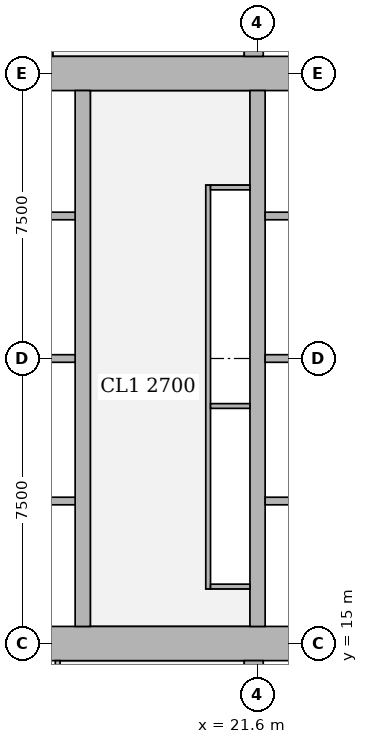
"""IFC4 building model, lengths in metres.
Left out: names, types, materials, properties, quantities, classifications, styles, units other than length and angle.
Written with IfcOpenShell. Run it as: python <this file> out.ifc"""

import sys

from ifc_helpers import new_model, si_unit, direction, frame, frame_2d, origin, place, context, subcontext, project, spatial, rectangle, extrude, element, fill, save


model = new_model("IFC4")
c1 = context("Model", 3, precision=1e-05, world=origin(), true_north=direction((0.0, 1.0)))
c2 = subcontext(c1, "Body", "Model", "MODEL_VIEW")
j1 = project(units=[si_unit("LENGTHUNIT", "METRE"), si_unit("PLANEANGLEUNIT", "RADIAN")], contexts=[c1])
p1 = place(None, origin())
s1 = spatial("IfcSite", under=j1, at=p1, CompositionType="ELEMENT")
p2 = place(p1, origin())
s2 = spatial("IfcBuilding", under=s1, at=p2, CompositionType="ELEMENT")
p3 = place(p2, frame((0.0, 0.0, 42.5)))
s3 = spatial("IfcBuildingStorey", under=s2, at=p3, CompositionType="ELEMENT", Elevation=42.5)
p4 = place(p3, frame((13.95, 15.0, 0.0), z_axis=(0.0, 0.0, 1.0), x_axis=(1.0, 0.0, 0.0)))
e1 = element("IfcWall", 1, at=p4, inside=s3, PredefinedType="SHEAR", context=c2, shape_type="SweptSolid", body=[
    extrude(rectangle(XDim=15.3, YDim=0.9, at=frame_2d((7.65, 0.0))), origin(), (0.0, 0.0, 1.0), 3.75),
])
p5 = place(p4, frame((4.45, 0.0, 0.0)))
e2 = element("IfcOpeningElement", 2, at=p5, cuts=e1, PredefinedType="OPENING", context=c2, shape_type="SweptSolid", body=[
    extrude(rectangle(XDim=1.8, YDim=2.1, at=frame_2d((0.9, 1.05))), frame((0.0, 0.46, 0.0), z_axis=(0.0, -1.0, 0.0), x_axis=(1.0, 0.0, 0.0)), (0.0, 0.0, 1.0), 0.92),
])
p6 = place(p4, frame((10.7, 0.0, 0.0)))
e3 = element("IfcOpeningElement", 3, at=p6, cuts=e1, PredefinedType="OPENING", context=c2, shape_type="SweptSolid", body=[
    extrude(rectangle(XDim=1.1, YDim=2.1, at=frame_2d((0.55, 1.05))), frame((0.0, 0.46, 0.0), z_axis=(0.0, -1.0, 0.0), x_axis=(1.0, 0.0, 0.0)), (0.0, 0.0, 1.0), 0.92),
])
p7 = place(p3, frame((13.95, 30.0, 0.0), z_axis=(0.0, 0.0, 1.0), x_axis=(1.0, 0.0, 0.0)))
e4 = element("IfcWall", 4, at=p7, inside=s3, PredefinedType="SHEAR", context=c2, shape_type="SweptSolid", body=[
    extrude(rectangle(XDim=15.3, YDim=0.9, at=frame_2d((7.65, 0.0))), origin(), (0.0, 0.0, 1.0), 3.75),
])
p8 = place(p7, frame((4.45, 0.0, 0.0)))
e5 = element("IfcOpeningElement", 5, at=p8, cuts=e4, PredefinedType="OPENING", context=c2, shape_type="SweptSolid", body=[
    extrude(rectangle(XDim=1.8, YDim=2.1, at=frame_2d((0.9, 1.05))), frame((0.0, 0.46, 0.0), z_axis=(0.0, -1.0, 0.0), x_axis=(1.0, 0.0, 0.0)), (0.0, 0.0, 1.0), 0.92),
])
p9 = place(p7, frame((10.7, 0.0, 0.0)))
e6 = element("IfcOpeningElement", 6, at=p9, cuts=e4, PredefinedType="OPENING", context=c2, shape_type="SweptSolid", body=[
    extrude(rectangle(XDim=1.1, YDim=2.1, at=frame_2d((0.55, 1.05))), frame((0.0, 0.46, 0.0), z_axis=(0.0, -1.0, 0.0), x_axis=(1.0, 0.0, 0.0)), (0.0, 0.0, 1.0), 0.92),
])
p10 = place(p3, frame((17.0, 15.45, 0.0), z_axis=(0.0, 0.0, 1.0), x_axis=(0.0, 1.0, 0.0)))
e7 = element("IfcWall", 7, at=p10, inside=s3, PredefinedType="SHEAR", context=c2, shape_type="SweptSolid", body=[
    extrude(rectangle(XDim=14.1, YDim=0.4, at=frame_2d((7.05, 0.0))), origin(), (0.0, 0.0, 1.0), 3.75),
])
p11 = place(p10, frame((0.875, 0.0, 0.0)))
e8 = element("IfcOpeningElement", 8, at=p11, cuts=e7, PredefinedType="OPENING", context=c2, shape_type="SweptSolid", body=[
    extrude(rectangle(XDim=1.1, YDim=2.1, at=frame_2d((0.55, 1.05))), frame((0.0, 0.21, 0.0), z_axis=(0.0, -1.0, 0.0), x_axis=(1.0, 0.0, 0.0)), (0.0, 0.0, 1.0), 0.42),
])
p12 = place(p10, frame((4.625, 0.0, 0.0)))
e9 = element("IfcOpeningElement", 9, at=p12, cuts=e7, PredefinedType="OPENING", context=c2, shape_type="SweptSolid", body=[
    extrude(rectangle(XDim=1.1, YDim=2.1, at=frame_2d((0.55, 1.05))), frame((0.0, 0.21, 0.0), z_axis=(0.0, -1.0, 0.0), x_axis=(1.0, 0.0, 0.0)), (0.0, 0.0, 1.0), 0.42),
])
p13 = place(p10, frame((8.375, 0.0, 0.0)))
e10 = element("IfcOpeningElement", 10, at=p13, cuts=e7, PredefinedType="OPENING", context=c2, shape_type="SweptSolid", body=[
    extrude(rectangle(XDim=1.1, YDim=2.1, at=frame_2d((0.55, 1.05))), frame((0.0, 0.21, 0.0), z_axis=(0.0, -1.0, 0.0), x_axis=(1.0, 0.0, 0.0)), (0.0, 0.0, 1.0), 0.42),
])
p14 = place(p10, frame((12.125, 0.0, 0.0)))
e11 = element("IfcOpeningElement", 11, at=p14, cuts=e7, PredefinedType="OPENING", context=c2, shape_type="SweptSolid", body=[
    extrude(rectangle(XDim=1.1, YDim=2.1, at=frame_2d((0.55, 1.05))), frame((0.0, 0.21, 0.0), z_axis=(0.0, -1.0, 0.0), x_axis=(1.0, 0.0, 0.0)), (0.0, 0.0, 1.0), 0.42),
])
p15 = place(p3, frame((21.6, 15.45, 0.0), z_axis=(0.0, 0.0, 1.0), x_axis=(0.0, 1.0, 0.0)))
e12 = element("IfcWall", 12, at=p15, inside=s3, PredefinedType="SHEAR", context=c2, shape_type="SweptSolid", body=[
    extrude(rectangle(XDim=14.1, YDim=0.4, at=frame_2d((7.05, 0.0))), origin(), (0.0, 0.0, 1.0), 3.75),
])
for number, where, z_axis, x_axis in (
    (13, (21.5, 10.35, 0.0), (0.0, 0.0, 1.0), (0.0, 1.0, 0.0)),
    (14, (21.5, 30.45, 0.0), (0.0, 0.0, 1.0), (0.0, 1.0, 0.0)),
):
    element("IfcWall", number, at=place(p3, frame(where, z_axis=z_axis, x_axis=x_axis)), inside=s3, PredefinedType="SHEAR", context=c2, shape_type="SweptSolid", body=[
        extrude(rectangle(XDim=4.2, YDim=0.5, at=frame_2d((2.1, 0.0))), origin(), (0.0, 0.0, 1.0), 3.75),
    ])
p16 = place(p3, frame((16.34, 10.413, 0.0), z_axis=(0.0, 0.0, 1.0), x_axis=(0.0, 1.0, 0.0)))
e15 = element("IfcWall", 15, at=p16, inside=s3, PredefinedType="PARTITIONING", context=c2, shape_type="SweptSolid", body=[
    extrude(rectangle(XDim=4.137, YDim=0.125, at=frame_2d((2.068, 0.0))), origin(), (0.0, 0.0, 1.0), 3.5),
])
p17 = place(p16, frame((1.512, 0.0, 0.0)))
e16 = element("IfcOpeningElement", 16, at=p17, cuts=e15, PredefinedType="OPENING", context=c2, shape_type="SweptSolid", body=[
    extrude(rectangle(XDim=1.0, YDim=2.1, at=frame_2d((0.5, 1.05))), frame((0.0, 0.073, 0.0), z_axis=(0.0, -1.0, 0.0), x_axis=(1.0, 0.0, 0.0)), (0.0, 0.0, 1.0), 0.145),
])
p18 = place(p3, frame((16.15, 30.45, 0.0), z_axis=(0.0, 0.0, 1.0), x_axis=(0.0, 1.0, 0.0)))
e17 = element("IfcWall", 17, at=p18, inside=s3, PredefinedType="PARTITIONING", context=c2, shape_type="SweptSolid", body=[
    extrude(rectangle(XDim=4.137, YDim=0.125, at=frame_2d((2.068, 0.0))), origin(), (0.0, 0.0, 1.0), 3.5),
])
p19 = place(p18, frame((1.625, 0.0, 0.0)))
e18 = element("IfcOpeningElement", 18, at=p19, cuts=e17, PredefinedType="OPENING", context=c2, shape_type="SweptSolid", body=[
    extrude(rectangle(XDim=1.0, YDim=2.1, at=frame_2d((0.5, 1.05))), frame((0.0, 0.073, 0.0), z_axis=(0.0, -1.0, 0.0), x_axis=(1.0, 0.0, 0.0)), (0.0, 0.0, 1.0), 0.145),
])
p20 = place(p3, frame((20.3, 16.438, 0.0), z_axis=(0.0, 0.0, 1.0), x_axis=(0.0, 1.0, 0.0)))
e19 = element("IfcWall", 19, at=p20, inside=s3, PredefinedType="PARTITIONING", context=c2, shape_type="SweptSolid", body=[
    extrude(rectangle(XDim=10.624, YDim=0.125, at=frame_2d((5.312, 0.0))), origin(), (0.0, 0.0, 1.0), 3.5),
])
p21 = place(p20, frame((1.937, 0.0, 0.0)))
e20 = element("IfcOpeningElement", 20, at=p21, cuts=e19, PredefinedType="OPENING", context=c2, shape_type="SweptSolid", body=[
    extrude(rectangle(XDim=1.0, YDim=2.1, at=frame_2d((0.5, 1.05))), frame((0.0, 0.073, 0.0), z_axis=(0.0, -1.0, 0.0), x_axis=(1.0, 0.0, 0.0)), (0.0, 0.0, 1.0), 0.145),
])
p22 = place(p20, frame((7.187, 0.0, 0.0)))
e21 = element("IfcOpeningElement", 21, at=p22, cuts=e19, PredefinedType="OPENING", context=c2, shape_type="SweptSolid", body=[
    extrude(rectangle(XDim=1.0, YDim=2.1, at=frame_2d((0.5, 1.05))), frame((0.0, 0.073, 0.0), z_axis=(0.0, -1.0, 0.0), x_axis=(1.0, 0.0, 0.0)), (0.0, 0.0, 1.0), 0.145),
])
for number, where, z_axis, x_axis in (
    (22, (20.363, 16.5, 0.0), (0.0, 0.0, 1.0), (1.0, 0.0, 0.0)),
    (23, (20.363, 27.0, 0.0), (0.0, 0.0, 1.0), (1.0, 0.0, 0.0)),
    (24, (20.363, 21.25, 0.0), (0.0, 0.0, 1.0), (1.0, 0.0, 0.0)),
):
    element("IfcWall", number, at=place(p3, frame(where, z_axis=z_axis, x_axis=x_axis)), inside=s3, PredefinedType="PARTITIONING", context=c2, shape_type="SweptSolid", body=[
        extrude(rectangle(XDim=1.037, YDim=0.125, at=frame_2d((0.519, 0.0))), origin(), (0.0, 0.0, 1.0), 3.5),
    ])
p23 = place(p3, frame((14.85, 18.75, 0.0), z_axis=(0.0, 0.0, 1.0), x_axis=(1.0, 0.0, 0.0)))
e25 = element("IfcWall", 25, at=p23, inside=s3, PredefinedType="SOLIDWALL", context=c2, shape_type="SweptSolid", body=[
    extrude(rectangle(XDim=1.95, YDim=0.2, at=frame_2d((0.975, 0.0))), origin(), (0.0, 0.0, 1.0), 3.5),
])
p24 = place(p3, frame((21.8, 18.75, 0.0), z_axis=(0.0, 0.0, 1.0), x_axis=(1.0, 0.0, 0.0)))
e26 = element("IfcWall", 26, at=p24, inside=s3, PredefinedType="SOLIDWALL", context=c2, shape_type="SweptSolid", body=[
    extrude(rectangle(XDim=2.2, YDim=0.2, at=frame_2d((1.1, 0.0))), origin(), (0.0, 0.0, 1.0), 3.5),
])
p25 = place(p3, frame((14.85, 22.5, 0.0), z_axis=(0.0, 0.0, 1.0), x_axis=(1.0, 0.0, 0.0)))
e27 = element("IfcWall", 27, at=p25, inside=s3, PredefinedType="SOLIDWALL", context=c2, shape_type="SweptSolid", body=[
    extrude(rectangle(XDim=1.95, YDim=0.2, at=frame_2d((0.975, 0.0))), origin(), (0.0, 0.0, 1.0), 3.5),
])
p26 = place(p3, frame((21.8, 22.5, 0.0), z_axis=(0.0, 0.0, 1.0), x_axis=(1.0, 0.0, 0.0)))
e28 = element("IfcWall", 28, at=p26, inside=s3, PredefinedType="SOLIDWALL", context=c2, shape_type="SweptSolid", body=[
    extrude(rectangle(XDim=2.2, YDim=0.2, at=frame_2d((1.1, 0.0))), origin(), (0.0, 0.0, 1.0), 3.5),
])
p27 = place(p3, frame((14.85, 26.25, 0.0), z_axis=(0.0, 0.0, 1.0), x_axis=(1.0, 0.0, 0.0)))
e29 = element("IfcWall", 29, at=p27, inside=s3, PredefinedType="SOLIDWALL", context=c2, shape_type="SweptSolid", body=[
    extrude(rectangle(XDim=1.95, YDim=0.2, at=frame_2d((0.975, 0.0))), origin(), (0.0, 0.0, 1.0), 3.5),
])
p28 = place(p3, frame((21.8, 26.25, 0.0), z_axis=(0.0, 0.0, 1.0), x_axis=(1.0, 0.0, 0.0)))
e30 = element("IfcWall", 30, at=p28, inside=s3, PredefinedType="SOLIDWALL", context=c2, shape_type="SweptSolid", body=[
    extrude(rectangle(XDim=2.2, YDim=0.2, at=frame_2d((1.1, 0.0))), origin(), (0.0, 0.0, 1.0), 3.5),
])
p29 = place(p21, origin())
e31 = element("IfcDoor", 31, at=p29, inside=s3, OperationType="SINGLE_SWING_RIGHT", PredefinedType="DOOR", context=c2, shape_type="SweptSolid", body=[
    extrude(rectangle(XDim=1.0, YDim=2.1, at=frame_2d((0.5, 1.05))), frame((0.0, 0.025, 0.0), z_axis=(0.0, -1.0, 0.0), x_axis=(1.0, 0.0, 0.0)), (0.0, 0.0, 1.0), 0.05),
])
fill(e20, e31)
p30 = place(p22, origin())
e32 = element("IfcDoor", 32, at=p30, inside=s3, OperationType="SINGLE_SWING_LEFT", PredefinedType="DOOR", context=c2, shape_type="SweptSolid", body=[
    extrude(rectangle(XDim=1.0, YDim=2.1, at=frame_2d((0.5, 1.05))), frame((0.0, 0.025, 0.0), z_axis=(0.0, -1.0, 0.0), x_axis=(1.0, 0.0, 0.0)), (0.0, 0.0, 1.0), 0.05),
])
fill(e21, e32)
p31 = place(p5, origin())
e33 = element("IfcDoor", 33, at=p31, inside=s3, OperationType="DOUBLE_DOOR_SINGLE_SWING", PredefinedType="DOOR", context=c2, shape_type="SweptSolid", body=[
    extrude(rectangle(XDim=1.8, YDim=2.1, at=frame_2d((0.9, 1.05))), frame((0.0, 0.025, 0.0), z_axis=(0.0, -1.0, 0.0), x_axis=(1.0, 0.0, 0.0)), (0.0, 0.0, 1.0), 0.05),
])
fill(e2, e33)
p32 = place(p8, origin())
e34 = element("IfcDoor", 34, at=p32, inside=s3, OperationType="DOUBLE_DOOR_SINGLE_SWING", PredefinedType="DOOR", context=c2, shape_type="SweptSolid", body=[
    extrude(rectangle(XDim=1.8, YDim=2.1, at=frame_2d((0.9, 1.05))), frame((0.0, 0.025, 0.0), z_axis=(0.0, -1.0, 0.0), x_axis=(1.0, 0.0, 0.0)), (0.0, 0.0, 1.0), 0.05),
])
fill(e5, e34)
p33 = place(p11, origin())
e35 = element("IfcDoor", 35, at=p33, inside=s3, OperationType="DOUBLE_DOOR_SLIDING", PredefinedType="DOOR", context=c2, shape_type="SweptSolid", body=[
    extrude(rectangle(XDim=1.1, YDim=2.1, at=frame_2d((0.55, 1.05))), frame((0.0, 0.025, 0.0), z_axis=(0.0, -1.0, 0.0), x_axis=(1.0, 0.0, 0.0)), (0.0, 0.0, 1.0), 0.05),
])
fill(e8, e35)
p34 = place(p12, origin())
e36 = element("IfcDoor", 36, at=p34, inside=s3, OperationType="DOUBLE_DOOR_SLIDING", PredefinedType="DOOR", context=c2, shape_type="SweptSolid", body=[
    extrude(rectangle(XDim=1.1, YDim=2.1, at=frame_2d((0.55, 1.05))), frame((0.0, 0.025, 0.0), z_axis=(0.0, -1.0, 0.0), x_axis=(1.0, 0.0, 0.0)), (0.0, 0.0, 1.0), 0.05),
])
fill(e9, e36)
p35 = place(p13, origin())
e37 = element("IfcDoor", 37, at=p35, inside=s3, OperationType="DOUBLE_DOOR_SLIDING", PredefinedType="DOOR", context=c2, shape_type="SweptSolid", body=[
    extrude(rectangle(XDim=1.1, YDim=2.1, at=frame_2d((0.55, 1.05))), frame((0.0, 0.025, 0.0), z_axis=(0.0, -1.0, 0.0), x_axis=(1.0, 0.0, 0.0)), (0.0, 0.0, 1.0), 0.05),
])
fill(e10, e37)
p36 = place(p14, origin())
e38 = element("IfcDoor", 38, at=p36, inside=s3, OperationType="DOUBLE_DOOR_SLIDING", PredefinedType="DOOR", context=c2, shape_type="SweptSolid", body=[
    extrude(rectangle(XDim=1.1, YDim=2.1, at=frame_2d((0.55, 1.05))), frame((0.0, 0.025, 0.0), z_axis=(0.0, -1.0, 0.0), x_axis=(1.0, 0.0, 0.0)), (0.0, 0.0, 1.0), 0.05),
])
fill(e11, e38)
save(model, sys.argv[1])
